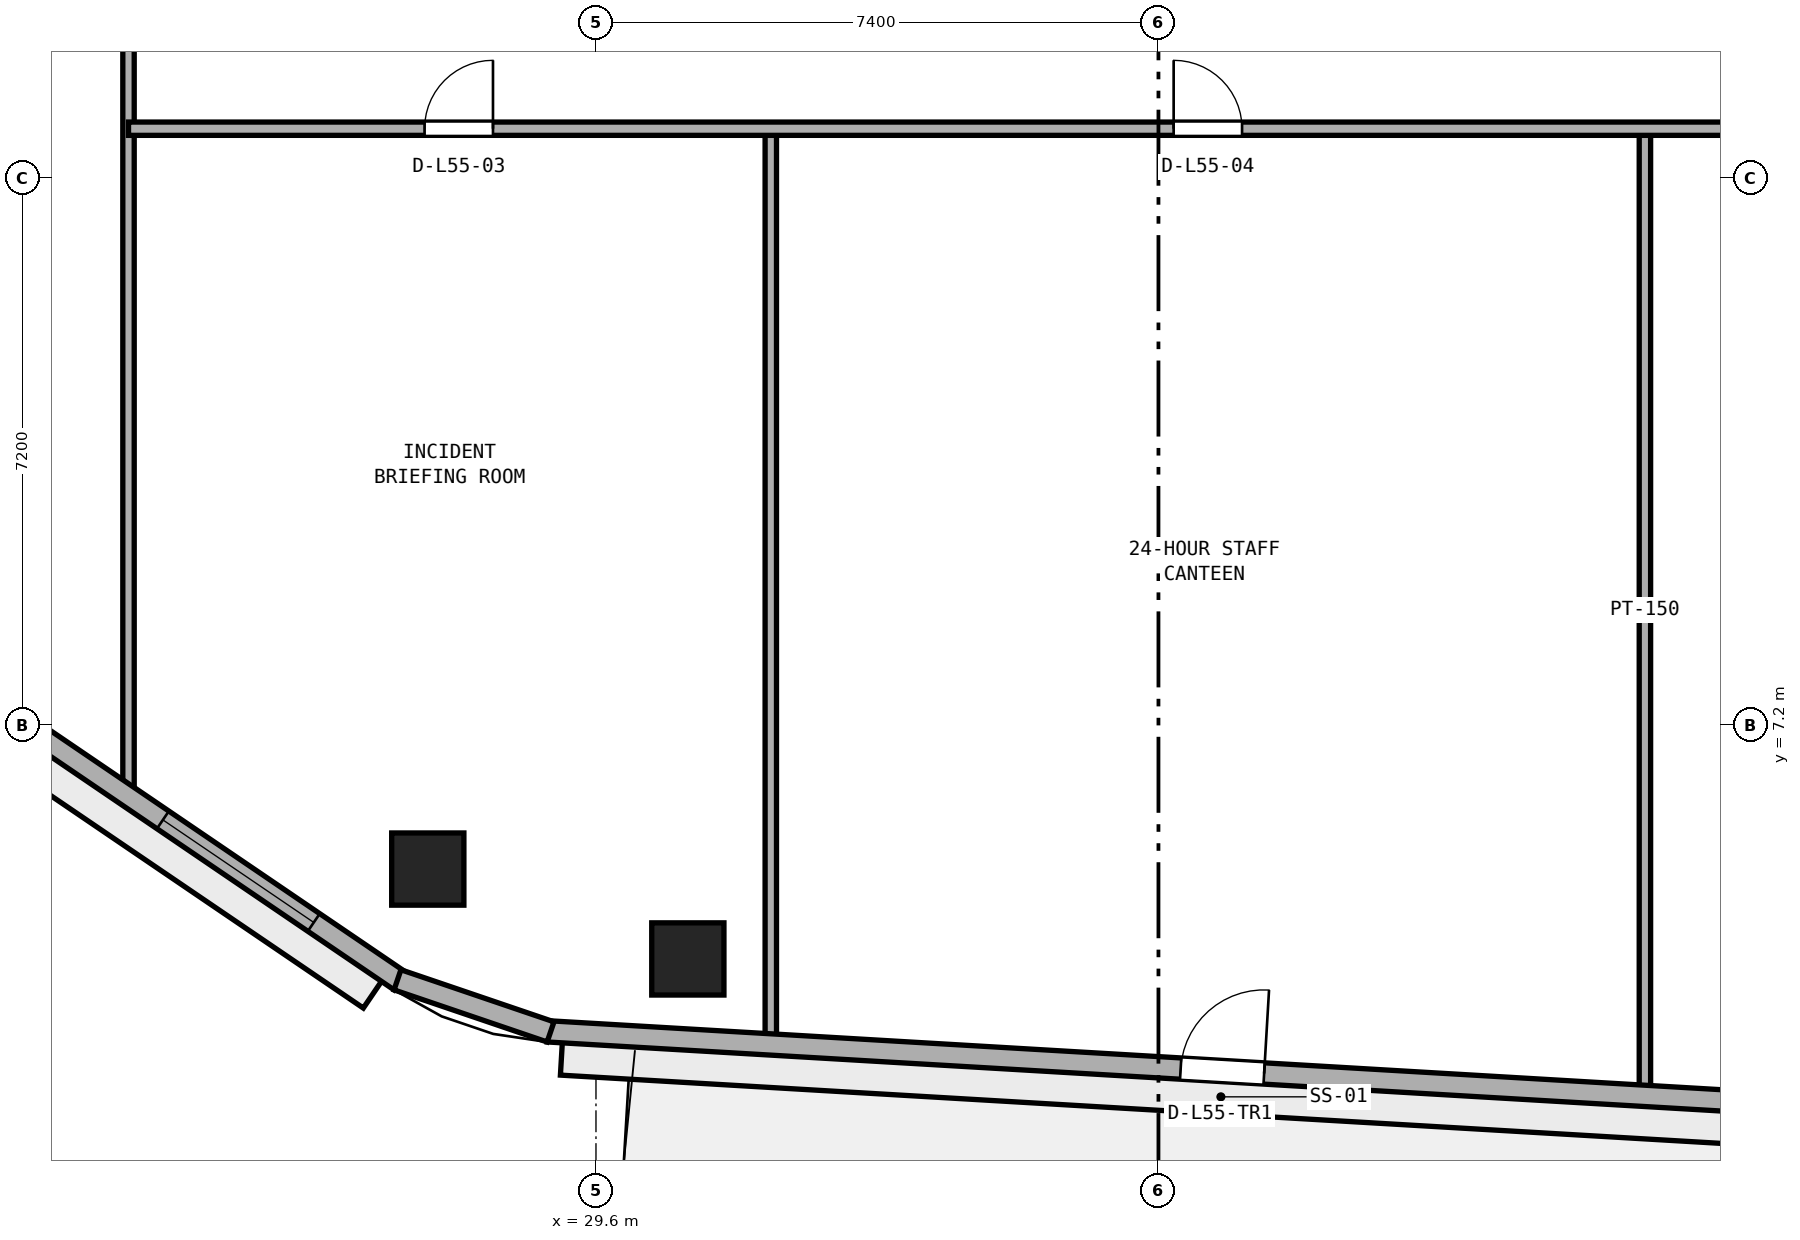
"""IFC4 building model, lengths in metres.
Left out: names, types, materials, properties, quantities, classifications, styles, units other than length and angle.
Written with IfcOpenShell. Run it as: python <this file> out.ifc"""

import sys

from ifc_helpers import new_model, si_unit, direction, frame, frame_2d, origin, origin_2d, place, context, subcontext, project, spatial, rectangle, extrude, element, fill, save


model = new_model("IFC4")
c1 = context("Model", 3, precision=1e-05, world=origin(), true_north=direction((0.0, 1.0)))
c2 = subcontext(c1, "Body", "Model", "MODEL_VIEW")
j1 = project(units=[si_unit("LENGTHUNIT", "METRE"), si_unit("PLANEANGLEUNIT", "RADIAN")], contexts=[c1])
p1 = place(None, origin())
s1 = spatial("IfcSite", under=j1, at=p1, CompositionType="ELEMENT")
p2 = place(p1, origin())
s2 = spatial("IfcBuilding", under=s1, at=p2, CompositionType="ELEMENT")
p3 = place(p2, frame((0.0, 0.0, 216.2)))
s3 = spatial("IfcBuildingStorey", under=s2, at=p3, CompositionType="ELEMENT", Elevation=216.2)
for number, where, z_axis, x_axis in (
    (1, (30.809, 4.127, 0.0), (0.0, 0.0, 1.0), (1.0, 0.0, 0.0)),
    (2, (27.387, 5.31, 0.0), (0.0, 0.0, 1.0), (1.0, 0.0, 0.0)),
):
    element("IfcColumn", number, at=place(p3, frame(where, z_axis=z_axis, x_axis=x_axis)), inside=s3, PredefinedType="COLUMN", context=c2, shape_type="SweptSolid", body=[
        extrude(rectangle(XDim=0.95, YDim=0.95, at=origin_2d()), origin(), (0.0, 0.0, 1.0), 3.8),
    ])
p4 = place(p3, frame((43.4, 2.391, 0.0), z_axis=(0.0, 0.0, 1.0), x_axis=(0.0, 1.0, 0.0)))
e3 = element("IfcWall", 3, at=p4, inside=s3, PredefinedType="PARTITIONING", context=c2, shape_type="SweptSolid", body=[
    extrude(rectangle(XDim=12.659, YDim=0.15, at=frame_2d((6.33, 0.0))), origin(), (0.0, 0.0, 1.0), 3.4),
])
p5 = place(p3, frame((31.9, 3.067, 0.0), z_axis=(0.0, 0.0, 1.0), x_axis=(0.0, 1.0, 0.0)))
e4 = element("IfcWall", 4, at=p5, inside=s3, PredefinedType="PARTITIONING", context=c2, shape_type="SweptSolid", body=[
    extrude(rectangle(XDim=11.983, YDim=0.15, at=frame_2d((5.991, 0.0))), origin(), (0.0, 0.0, 1.0), 3.4),
])
p6 = place(p3, frame((23.45, 6.235, 0.0), z_axis=(0.0, 0.0, 1.0), x_axis=(0.0, 1.0, 0.0)))
e5 = element("IfcWall", 5, at=p6, inside=s3, PredefinedType="PARTITIONING", context=c2, shape_type="SweptSolid", body=[
    extrude(rectangle(XDim=17.615, YDim=0.15, at=frame_2d((8.808, 0.0))), origin(), (0.0, 0.0, 1.0), 3.4),
])
p7 = place(p3, frame((23.45, 15.05, 0.0), z_axis=(0.0, 0.0, 1.0), x_axis=(1.0, 0.0, 0.0)))
e6 = element("IfcWall", 6, at=p7, inside=s3, PredefinedType="PARTITIONING", context=c2, shape_type="SweptSolid", body=[
    extrude(rectangle(XDim=27.1, YDim=0.175, at=frame_2d((13.55, 0.0))), origin(), (0.0, 0.0, 1.0), 3.4),
])
p8 = place(p7, frame((3.895, 0.0, 0.0)))
e7 = element("IfcOpeningElement", 7, at=p8, cuts=e6, PredefinedType="OPENING", context=c2, shape_type="SweptSolid", body=[
    extrude(rectangle(XDim=0.9, YDim=2.1, at=frame_2d((0.45, 1.05))), frame((0.0, 0.097, 0.0), z_axis=(0.0, -1.0, 0.0), x_axis=(1.0, 0.0, 0.0)), (0.0, 0.0, 1.0), 0.195),
])
p9 = place(p7, frame((13.75, 0.0, 0.0)))
e8 = element("IfcOpeningElement", 8, at=p9, cuts=e6, PredefinedType="OPENING", context=c2, shape_type="SweptSolid", body=[
    extrude(rectangle(XDim=0.9, YDim=2.1, at=frame_2d((0.45, 1.05))), frame((0.0, 0.097, 0.0), z_axis=(0.0, -1.0, 0.0), x_axis=(1.0, 0.0, 0.0)), (0.0, 0.0, 1.0), 0.195),
])
p10 = place(p7, frame((22.955, 0.0, 0.0)))
e9 = element("IfcOpeningElement", 9, at=p10, cuts=e6, PredefinedType="OPENING", context=c2, shape_type="SweptSolid", body=[
    extrude(rectangle(XDim=0.9, YDim=2.1, at=frame_2d((0.45, 1.05))), frame((0.0, 0.097, 0.0), z_axis=(0.0, -1.0, 0.0), x_axis=(1.0, 0.0, 0.0)), (0.0, 0.0, 1.0), 0.195),
])
p11 = place(p3, frame((28.966, 3.175, 0.0), z_axis=(0.0, 0.0, 1.0), x_axis=(0.998274467859, -0.058720412304, 0.0)))
e10 = element("IfcWall", 10, at=p11, inside=s3, PredefinedType="STANDARD", context=c2, shape_type="SweptSolid", body=[
    extrude(rectangle(XDim=17.782, YDim=0.28, at=frame_2d((8.891, 0.0))), origin(), (0.0, 0.0, 1.0), 3.4),
])
p12 = place(p11, frame((8.341, 0.0, 0.0)))
e11 = element("IfcOpeningElement", 11, at=p12, cuts=e10, PredefinedType="OPENING", context=c2, shape_type="SweptSolid", body=[
    extrude(rectangle(XDim=1.1, YDim=2.2, at=frame_2d((0.55, 1.1))), frame((0.0, 0.15, 0.0), z_axis=(0.0, -1.0, 0.0), x_axis=(1.0, 0.0, 0.0)), (0.0, 0.0, 1.0), 0.3),
])
p13 = place(p3, frame((13.43, 13.075, 0.0), z_axis=(0.0, 0.0, 1.0), x_axis=(0.827025402003, -0.562164552815, 0.0)))
e12 = element("IfcWall", 12, at=p13, inside=s3, PredefinedType="STANDARD", context=c2, shape_type="SweptSolid", body=[
    extrude(rectangle(XDim=16.435, YDim=0.28, at=frame_2d((8.218, 0.0))), origin(), (0.0, 0.0, 1.0), 3.4),
])
p14 = place(p13, frame((1.873, 0.0, 0.9)))
e13 = element("IfcOpeningElement", 13, at=p14, cuts=e12, PredefinedType="OPENING", context=c2, shape_type="SweptSolid", body=[
    extrude(rectangle(XDim=2.4, YDim=1.75, at=frame_2d((1.2, 0.875))), frame((0.0, 0.15, 0.0), z_axis=(0.0, -1.0, 0.0), x_axis=(1.0, 0.0, 0.0)), (0.0, 0.0, 1.0), 0.3),
])
p15 = place(p13, frame((7.018, 0.0, 0.9)))
e14 = element("IfcOpeningElement", 14, at=p15, cuts=e12, PredefinedType="OPENING", context=c2, shape_type="SweptSolid", body=[
    extrude(rectangle(XDim=2.4, YDim=1.75, at=frame_2d((1.2, 0.875))), frame((0.0, 0.15, 0.0), z_axis=(0.0, -1.0, 0.0), x_axis=(1.0, 0.0, 0.0)), (0.0, 0.0, 1.0), 0.3),
])
p16 = place(p13, frame((12.663, 0.0, 0.9)))
e15 = element("IfcOpeningElement", 15, at=p16, cuts=e12, PredefinedType="OPENING", context=c2, shape_type="SweptSolid", body=[
    extrude(rectangle(XDim=2.4, YDim=1.75, at=frame_2d((1.2, 0.875))), frame((0.0, 0.15, 0.0), z_axis=(0.0, -1.0, 0.0), x_axis=(1.0, 0.0, 0.0)), (0.0, 0.0, 1.0), 0.3),
])
p17 = place(p3, frame((26.989, 3.853, 0.0), z_axis=(0.0, 0.0, 1.0), x_axis=(0.946713959835, -0.322075578479, 0.0)))
e16 = element("IfcWall", 16, at=p17, inside=s3, PredefinedType="STANDARD", context=c2, shape_type="SweptSolid", body=[
    extrude(rectangle(XDim=2.127, YDim=0.28, at=frame_2d((1.063, 0.0))), origin(), (0.0, 0.0, 1.0), 3.4),
])
p18 = place(p8, origin())
e17 = element("IfcDoor", 17, at=p18, inside=s3, OperationType="SINGLE_SWING_RIGHT", PredefinedType="DOOR", context=c2, shape_type="SweptSolid", body=[
    extrude(rectangle(XDim=0.9, YDim=2.1, at=frame_2d((0.45, 1.05))), frame((0.0, 0.025, 0.0), z_axis=(0.0, -1.0, 0.0), x_axis=(1.0, 0.0, 0.0)), (0.0, 0.0, 1.0), 0.05),
])
fill(e7, e17)
p19 = place(p9, origin())
e18 = element("IfcDoor", 18, at=p19, inside=s3, OperationType="SINGLE_SWING_LEFT", PredefinedType="DOOR", context=c2, shape_type="SweptSolid", body=[
    extrude(rectangle(XDim=0.9, YDim=2.1, at=frame_2d((0.45, 1.05))), frame((0.0, 0.025, 0.0), z_axis=(0.0, -1.0, 0.0), x_axis=(1.0, 0.0, 0.0)), (0.0, 0.0, 1.0), 0.05),
])
fill(e8, e18)
p20 = place(p12, origin())
e19 = element("IfcDoor", 19, at=p20, inside=s3, OperationType="SINGLE_SWING_RIGHT", PredefinedType="DOOR", context=c2, shape_type="SweptSolid", body=[
    extrude(rectangle(XDim=1.1, YDim=2.2, at=frame_2d((0.55, 1.1))), frame((0.0, 0.025, 0.0), z_axis=(0.0, -1.0, 0.0), x_axis=(1.0, 0.0, 0.0)), (0.0, 0.0, 1.0), 0.05),
])
fill(e11, e19)
p21 = place(p16, origin())
e20 = element("IfcWindow", 20, at=p21, inside=s3, PartitioningType="SINGLE_PANEL", PredefinedType="WINDOW", context=c2, shape_type="SweptSolid", body=[
    extrude(rectangle(XDim=2.4, YDim=1.75, at=frame_2d((1.2, 0.875))), frame((0.0, 0.03, 0.0), z_axis=(0.0, -1.0, 0.0), x_axis=(1.0, 0.0, 0.0)), (0.0, 0.0, 1.0), 0.06),
])
fill(e15, e20)
save(model, sys.argv[1])
